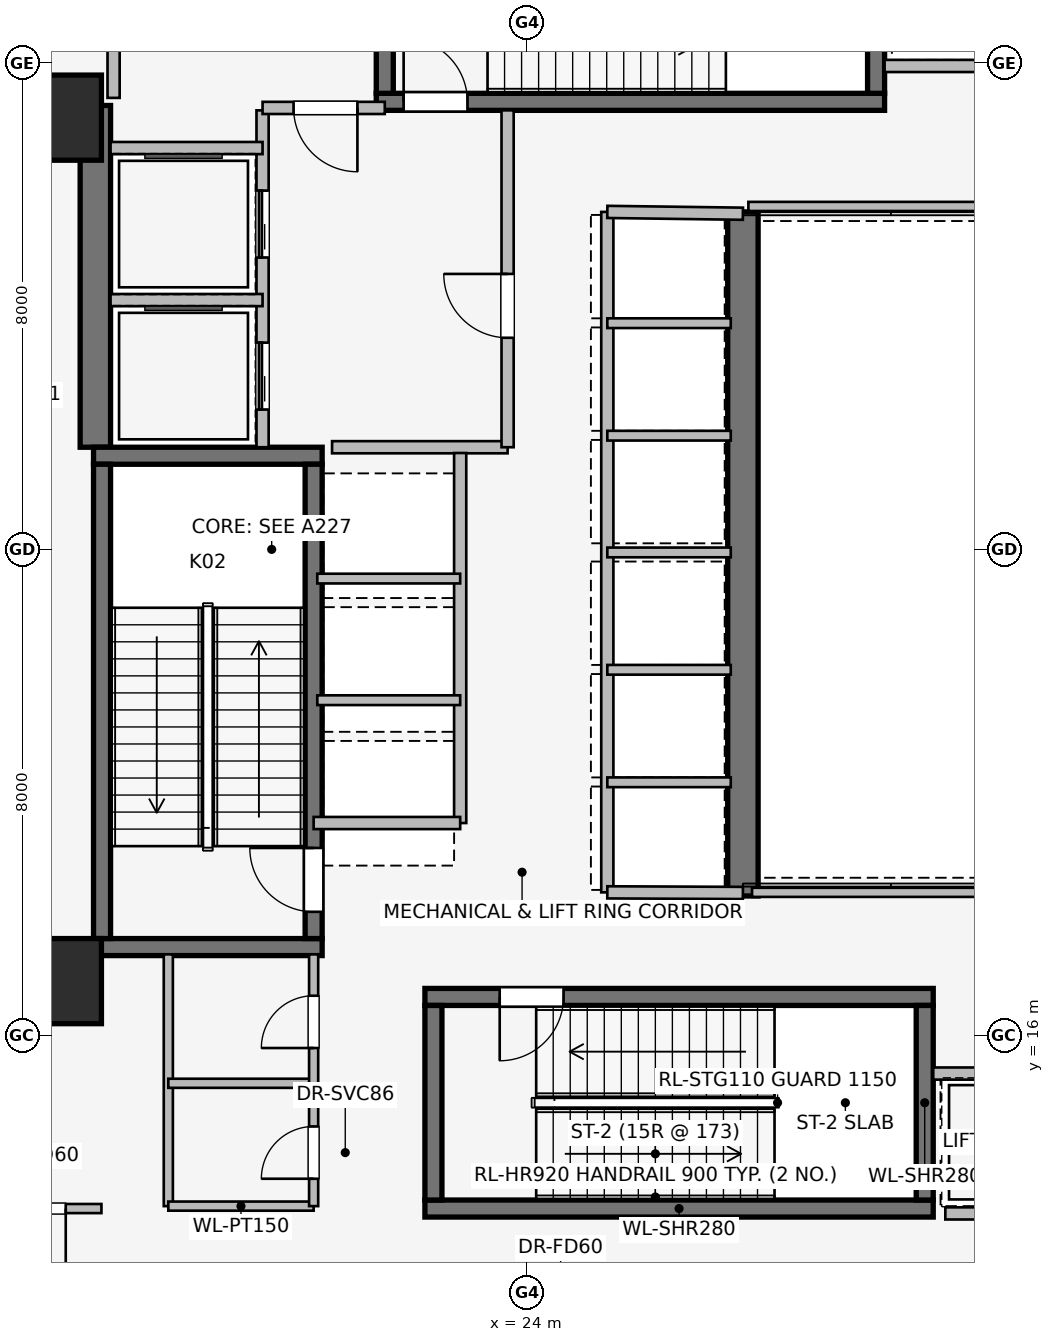
"""IFC4 building model, lengths in metres.
Left out: names, types, materials, properties, quantities, classifications, styles, units other than length and angle.
Written with IfcOpenShell. Run it as: python <this file> out.ifc"""

import sys

from ifc_helpers import new_model, si_unit, direction, frame, frame_2d, origin, origin_2d, place, context, subcontext, project, spatial, rectangle, extrude, element, fill, save


model = new_model("IFC4")
c1 = context("Model", 3, precision=1e-05, world=origin(), true_north=direction((0.0, 1.0)))
c2 = subcontext(c1, "Body", "Model", "MODEL_VIEW")
j1 = project(units=[si_unit("LENGTHUNIT", "METRE"), si_unit("PLANEANGLEUNIT", "RADIAN")], contexts=[c1])
p1 = place(None, origin())
s1 = spatial("IfcSite", under=j1, at=p1, CompositionType="ELEMENT")
p2 = place(p1, origin())
s2 = spatial("IfcBuilding", under=s1, at=p2, CompositionType="ELEMENT")
p3 = place(p2, frame((0.0, 0.0, 96.35)))
s3 = spatial("IfcBuildingStorey", under=s2, at=p3, CompositionType="ELEMENT", Elevation=96.35)
p4 = place(p3, frame((16.9, 25.68, 0.0), z_axis=(0.0, 0.0, 1.0), x_axis=(0.0, 1.0, 0.0)))
e1 = element("IfcWall", 1, at=p4, inside=s3, PredefinedType="SHEAR", context=c2, shape_type="SweptSolid", body=[
    extrude(rectangle(XDim=5.62, YDim=0.5, at=frame_2d((2.81, 0.0))), origin(), (0.0, 0.0, 1.0), 5.2),
])
p5 = place(p3, frame((27.55, 29.55, 0.0), z_axis=(0.0, 0.0, 1.0), x_axis=(0.0, -1.0, 0.0)))
e2 = element("IfcWall", 2, at=p5, inside=s3, PredefinedType="SHEAR", context=c2, shape_type="SweptSolid", body=[
    extrude(rectangle(XDim=11.25, YDim=0.5, at=frame_2d((5.625, 0.0))), origin(), (0.0, 0.0, 1.0), 5.2),
])
for number, where, z_axis, x_axis in (
    (3, (16.87, 17.46, 0.0), (0.0, 0.0, 1.0), (1.0, 0.0, 0.0)),
    (4, (20.63, 25.54, 0.0), (0.0, 0.0, 1.0), (-1.0, 0.0, 0.0)),
):
    element("IfcWall", number, at=place(p3, frame(where, z_axis=z_axis, x_axis=x_axis)), inside=s3, PredefinedType="SHEAR", context=c2, shape_type="SweptSolid", body=[
        extrude(rectangle(XDim=3.76, YDim=0.28, at=frame_2d((1.88, 0.0))), origin(), (0.0, 0.0, 1.0), 5.2),
    ])
p6 = place(p3, frame((17.01, 25.4, 0.0), z_axis=(0.0, 0.0, 1.0), x_axis=(0.0, -1.0, 0.0)))
e5 = element("IfcWall", 5, at=p6, inside=s3, PredefinedType="SHEAR", context=c2, shape_type="SweptSolid", body=[
    extrude(rectangle(XDim=7.8, YDim=0.28, at=frame_2d((3.9, 0.0))), origin(), (0.0, 0.0, 1.0), 5.2),
])
p7 = place(p3, frame((20.49, 17.6, 0.0), z_axis=(0.0, 0.0, 1.0), x_axis=(0.0, 1.0, 0.0)))
e6 = element("IfcWall", 6, at=p7, inside=s3, PredefinedType="SHEAR", context=c2, shape_type="SweptSolid", body=[
    extrude(rectangle(XDim=7.8, YDim=0.28, at=frame_2d((3.9, 0.0))), origin(), (0.0, 0.0, 1.0), 5.2),
])
p8 = place(p7, frame((0.44, 0.0, 0.0)))
e7 = element("IfcOpeningElement", 7, at=p8, cuts=e6, PredefinedType="OPENING", context=c2, shape_type="SweptSolid", body=[
    extrude(rectangle(XDim=1.05, YDim=2.0, at=frame_2d((0.525, 1.0))), frame((0.0, 0.15, 0.0), z_axis=(0.0, -1.0, 0.0), x_axis=(1.0, 0.0, 0.0)), (0.0, 0.0, 1.0), 0.3),
])
p9 = place(p3, frame((22.32, 13.16, 0.0), z_axis=(0.0, 0.0, 1.0), x_axis=(1.0, 0.0, 0.0)))
e8 = element("IfcWall", 8, at=p9, inside=s3, PredefinedType="SHEAR", context=c2, shape_type="SweptSolid", body=[
    extrude(rectangle(XDim=8.36, YDim=0.28, at=frame_2d((4.18, 0.0))), origin(), (0.0, 0.0, 1.0), 5.2),
])
p10 = place(p3, frame((30.68, 16.64, 0.0), z_axis=(0.0, 0.0, 1.0), x_axis=(-1.0, 0.0, 0.0)))
e9 = element("IfcWall", 9, at=p10, inside=s3, PredefinedType="SHEAR", context=c2, shape_type="SweptSolid", body=[
    extrude(rectangle(XDim=8.36, YDim=0.28, at=frame_2d((4.18, 0.0))), origin(), (0.0, 0.0, 1.0), 5.2),
])
p11 = place(p10, frame((6.08, 0.0, 0.0)))
e10 = element("IfcOpeningElement", 10, at=p11, cuts=e9, PredefinedType="OPENING", context=c2, shape_type="SweptSolid", body=[
    extrude(rectangle(XDim=1.05, YDim=2.0, at=frame_2d((0.525, 1.0))), frame((0.0, 0.15, 0.0), z_axis=(0.0, -1.0, 0.0), x_axis=(1.0, 0.0, 0.0)), (0.0, 0.0, 1.0), 0.3),
])
for number, where, z_axis, x_axis in (
    (11, (22.46, 16.5, 0.0), (0.0, 0.0, 1.0), (0.0, -1.0, 0.0)),
    (12, (30.54, 13.3, 0.0), (0.0, 0.0, 1.0), (0.0, 1.0, 0.0)),
):
    element("IfcWall", number, at=place(p3, frame(where, z_axis=z_axis, x_axis=x_axis)), inside=s3, PredefinedType="SHEAR", context=c2, shape_type="SweptSolid", body=[
        extrude(rectangle(XDim=3.2, YDim=0.28, at=frame_2d((1.6, 0.0))), origin(), (0.0, 0.0, 1.0), 5.2),
    ])
p12 = place(p3, frame((21.52, 31.36, 0.0), z_axis=(0.0, 0.0, 1.0), x_axis=(1.0, 0.0, 0.0)))
e13 = element("IfcWall", 13, at=p12, inside=s3, PredefinedType="SHEAR", context=c2, shape_type="SweptSolid", body=[
    extrude(rectangle(XDim=8.36, YDim=0.28, at=frame_2d((4.18, 0.0))), origin(), (0.0, 0.0, 1.0), 5.2),
])
p13 = place(p12, frame((0.45, 0.0, 0.0)))
e14 = element("IfcOpeningElement", 14, at=p13, cuts=e13, PredefinedType="OPENING", context=c2, shape_type="SweptSolid", body=[
    extrude(rectangle(XDim=1.05, YDim=2.0, at=frame_2d((0.525, 1.0))), frame((0.0, 0.15, 0.0), z_axis=(0.0, -1.0, 0.0), x_axis=(1.0, 0.0, 0.0)), (0.0, 0.0, 1.0), 0.3),
])
for number, where, z_axis, x_axis in (
    (15, (21.66, 34.7, 0.0), (0.0, 0.0, 1.0), (0.0, -1.0, 0.0)),
    (16, (29.74, 31.5, 0.0), (0.0, 0.0, 1.0), (0.0, 1.0, 0.0)),
):
    element("IfcWall", number, at=place(p3, frame(where, z_axis=z_axis, x_axis=x_axis)), inside=s3, PredefinedType="SHEAR", context=c2, shape_type="SweptSolid", body=[
        extrude(rectangle(XDim=3.2, YDim=0.28, at=frame_2d((1.6, 0.0))), origin(), (0.0, 0.0, 1.0), 5.2),
    ])
for number, where, z_axis, x_axis in (
    (17, (16.3, 16.9, 0.0), (0.0, 0.0, 1.0), (1.0, 0.0, 0.0)),
    (18, (16.3, 31.1, 0.0), (0.0, 0.0, 1.0), (1.0, 0.0, 0.0)),
):
    element("IfcColumn", number, at=place(p3, frame(where, z_axis=z_axis, x_axis=x_axis)), inside=s3, PredefinedType="COLUMN", context=c2, shape_type="SweptSolid", body=[
        extrude(rectangle(XDim=1.4, YDim=1.4, at=origin_2d()), origin(), (0.0, 0.0, 1.0), 5.2),
    ])
p14 = place(p3, frame((19.65, 25.68, 0.0), z_axis=(0.0, 0.0, 1.0), x_axis=(0.0, 1.0, 0.0)))
e19 = element("IfcWall", 19, at=p14, inside=s3, PredefinedType="PARTITIONING", context=c2, shape_type="SweptSolid", body=[
    extrude(rectangle(XDim=5.54, YDim=0.2, at=frame_2d((2.77, 0.0))), origin(), (0.0, 0.0, 1.0), 4.78),
])
p15 = place(p14, frame((0.62, 0.0, 0.0)))
e20 = element("IfcOpeningElement", 20, at=p15, cuts=e19, PredefinedType="OPENING", context=c2, shape_type="SweptSolid", body=[
    extrude(rectangle(XDim=1.1, YDim=2.2, at=frame_2d((0.55, 1.1))), frame((0.0, 0.11, 0.0), z_axis=(0.0, -1.0, 0.0), x_axis=(1.0, 0.0, 0.0)), (0.0, 0.0, 1.0), 0.22),
])
p16 = place(p14, frame((3.12, 0.0, 0.0)))
e21 = element("IfcOpeningElement", 21, at=p16, cuts=e19, PredefinedType="OPENING", context=c2, shape_type="SweptSolid", body=[
    extrude(rectangle(XDim=1.1, YDim=2.2, at=frame_2d((0.55, 1.1))), frame((0.0, 0.11, 0.0), z_axis=(0.0, -1.0, 0.0), x_axis=(1.0, 0.0, 0.0)), (0.0, 0.0, 1.0), 0.22),
])
p17 = place(p3, frame((20.793, 25.68, 0.0), z_axis=(0.0, 0.0, 1.0), x_axis=(1.0, 0.0, 0.0)))
e22 = element("IfcWall", 22, at=p17, inside=s3, PredefinedType="PARTITIONING", context=c2, shape_type="SweptSolid", body=[
    extrude(rectangle(XDim=2.887, YDim=0.2, at=frame_2d((1.443, 0.0))), origin(), (0.0, 0.0, 1.0), 4.78),
])
p18 = place(p3, frame((23.68, 25.68, 0.0), z_axis=(0.0, 0.0, 1.0), x_axis=(0.0, 1.0, 0.0)))
e23 = element("IfcWall", 23, at=p18, inside=s3, PredefinedType="PARTITIONING", context=c2, shape_type="SweptSolid", body=[
    extrude(rectangle(XDim=5.54, YDim=0.2, at=frame_2d((2.77, 0.0))), origin(), (0.0, 0.0, 1.0), 4.78),
])
p19 = place(p18, frame((1.8, 0.0, 0.0)))
e24 = element("IfcOpeningElement", 24, at=p19, cuts=e23, PredefinedType="OPENING", context=c2, shape_type="SweptSolid", body=[
    extrude(rectangle(XDim=1.05, YDim=2.0, at=frame_2d((0.525, 1.0))), frame((0.0, 0.11, 0.0), z_axis=(0.0, -1.0, 0.0), x_axis=(1.0, 0.0, 0.0)), (0.0, 0.0, 1.0), 0.22),
])
p20 = place(p3, frame((21.66, 31.26, 0.0), z_axis=(0.0, 0.0, 1.0), x_axis=(-1.0, 0.0, 0.0)))
e25 = element("IfcWall", 25, at=p20, inside=s3, PredefinedType="PARTITIONING", context=c2, shape_type="SweptSolid", body=[
    extrude(rectangle(XDim=2.01, YDim=0.2, at=frame_2d((1.005, 0.0))), origin(), (0.0, 0.0, 1.0), 4.78),
])
p21 = place(p20, frame((0.45, 0.0, 0.0)))
e26 = element("IfcOpeningElement", 26, at=p21, cuts=e25, PredefinedType="OPENING", context=c2, shape_type="SweptSolid", body=[
    extrude(rectangle(XDim=1.05, YDim=2.0, at=frame_2d((0.525, 1.0))), frame((0.0, 0.11, 0.0), z_axis=(0.0, -1.0, 0.0), x_axis=(1.0, 0.0, 0.0)), (0.0, 0.0, 1.0), 0.22),
])
p22 = place(p3, frame((17.15, 28.1, 0.0), z_axis=(0.0, 0.0, 1.0), x_axis=(1.0, 0.0, 0.0)))
e27 = element("IfcWall", 27, at=p22, inside=s3, PredefinedType="PARTITIONING", context=c2, shape_type="SweptSolid", body=[
    extrude(rectangle(XDim=2.5, YDim=0.2, at=frame_2d((1.25, 0.0))), origin(), (0.0, 0.0, 1.0), 4.78),
])
p23 = place(p3, frame((19.65, 30.6, 0.0), z_axis=(0.0, 0.0, 1.0), x_axis=(-1.0, 0.0, 0.0)))
e28 = element("IfcWall", 28, at=p23, inside=s3, PredefinedType="PARTITIONING", context=c2, shape_type="SweptSolid", body=[
    extrude(rectangle(XDim=2.5, YDim=0.2, at=frame_2d((1.25, 0.0))), origin(), (0.0, 0.0, 1.0), 3.68),
])
p24 = place(p3, frame((33.5, 15.38, 0.0), z_axis=(0.0, 0.0, 1.0), x_axis=(-1.0, 0.0, 0.0)))
e29 = element("IfcWall", 29, at=p24, inside=s3, PredefinedType="PARTITIONING", context=c2, shape_type="SweptSolid", body=[
    extrude(rectangle(XDim=2.82, YDim=0.2, at=frame_2d((1.41, 0.0))), origin(), (0.0, 0.0, 1.0), 4.78),
])
p25 = place(p24, frame((0.8, 0.0, 0.0)))
e30 = element("IfcOpeningElement", 30, at=p25, cuts=e29, PredefinedType="OPENING", context=c2, shape_type="SweptSolid", body=[
    extrude(rectangle(XDim=1.2, YDim=2.2, at=frame_2d((0.6, 1.1))), frame((0.0, 0.11, 0.0), z_axis=(0.0, -1.0, 0.0), x_axis=(1.0, 0.0, 0.0)), (0.0, 0.0, 1.0), 0.22),
])
p26 = place(p3, frame((30.879, 13.08, 0.0), z_axis=(0.0, 0.0, 1.0), x_axis=(1.0, 0.0, 0.0)))
e31 = element("IfcWall", 31, at=p26, inside=s3, PredefinedType="PARTITIONING", context=c2, shape_type="SweptSolid", body=[
    extrude(rectangle(XDim=2.621, YDim=0.2, at=frame_2d((1.311, 0.0))), origin(), (0.0, 0.0, 1.0), 4.78),
])
p27 = place(p3, frame((32.48, 31.95, 0.0), z_axis=(0.0, 0.0, 1.0), x_axis=(-1.0, 0.0, 0.0)))
e32 = element("IfcWall", 32, at=p27, inside=s3, PredefinedType="PARTITIONING", context=c2, shape_type="SweptSolid", body=[
    extrude(rectangle(XDim=2.6, YDim=0.2, at=frame_2d((1.3, 0.0))), origin(), (0.0, 0.0, 1.0), 4.78),
])
p28 = place(p3, frame((22.9, 19.5, 0.0), z_axis=(0.0, 0.0, 1.0), x_axis=(0.0, 1.0, 0.0)))
e33 = element("IfcWall", 33, at=p28, inside=s3, PredefinedType="PARTITIONING", context=c2, shape_type="SweptSolid", body=[
    extrude(rectangle(XDim=6.085, YDim=0.2, at=frame_2d((3.042, 0.0))), origin(), (0.0, 0.0, 1.0), 4.78),
])
p29 = place(p3, frame((20.49, 19.5, 0.0), z_axis=(0.0, 0.0, 1.0), x_axis=(1.0, 0.0, 0.0)))
e34 = element("IfcWall", 34, at=p29, inside=s3, PredefinedType="PARTITIONING", context=c2, shape_type="SweptSolid", body=[
    extrude(rectangle(XDim=2.41, YDim=0.2, at=frame_2d((1.205, 0.0))), origin(), (0.0, 0.0, 1.0), 3.68),
])
for number, where, z_axis, x_axis in (
    (35, (20.55, 21.52, 0.0), (0.0, 0.0, 1.0), (1.0, 0.0, 0.0)),
    (36, (20.55, 23.52, 0.0), (0.0, 0.0, 1.0), (1.0, 0.0, 0.0)),
):
    element("IfcWall", number, at=place(p3, frame(where, z_axis=z_axis, x_axis=x_axis)), inside=s3, PredefinedType="PARTITIONING", context=c2, shape_type="SweptSolid", body=[
        extrude(rectangle(XDim=2.35, YDim=0.16, at=frame_2d((1.175, 0.0))), origin(), (0.0, 0.0, 1.0), 4.78),
    ])
p30 = place(p3, frame((25.32, 29.55, 0.0), z_axis=(0.0, 0.0, 1.0), x_axis=(0.0, -1.0, 0.0)))
e37 = element("IfcWall", 37, at=p30, inside=s3, PredefinedType="PARTITIONING", context=c2, shape_type="SweptSolid", body=[
    extrude(rectangle(XDim=11.19, YDim=0.2, at=frame_2d((5.595, 0.0))), origin(), (0.0, 0.0, 1.0), 4.78),
])
p31 = place(p3, frame((25.32, 18.36, 0.0), z_axis=(0.0, 0.0, 1.0), x_axis=(0.999989925833, -0.004488678231, 0.0)))
e38 = element("IfcWall", 38, at=p31, inside=s3, PredefinedType="PARTITIONING", context=c2, shape_type="SweptSolid", body=[
    extrude(rectangle(XDim=2.23, YDim=0.2, at=frame_2d((1.115, 0.0))), origin(), (0.0, 0.0, 1.0), 4.78),
])
p32 = place(p3, frame((27.55, 29.52, 0.0), z_axis=(0.0, 0.0, 1.0), x_axis=(-0.999909343457, 0.013464949556, 0.0)))
e39 = element("IfcWall", 39, at=p32, inside=s3, PredefinedType="PARTITIONING", context=c2, shape_type="SweptSolid", body=[
    extrude(rectangle(XDim=2.23, YDim=0.2, at=frame_2d((1.115, 0.0))), origin(), (0.0, 0.0, 1.0), 3.68),
])
p33 = place(p3, frame((25.32, 20.17, 0.0), z_axis=(0.0, 0.0, 1.0), x_axis=(1.0, 0.0, 0.0)))
e40 = element("IfcWall", 40, at=p33, inside=s3, PredefinedType="PARTITIONING", context=c2, shape_type="SweptSolid", body=[
    extrude(rectangle(XDim=2.03, YDim=0.16, at=frame_2d((1.015, 0.0))), origin(), (0.0, 0.0, 1.0), 3.68),
])
for number, where, z_axis, x_axis in (
    (41, (25.32, 22.02, 0.0), (0.0, 0.0, 1.0), (1.0, 0.0, 0.0)),
    (42, (25.32, 23.95, 0.0), (0.0, 0.0, 1.0), (1.0, 0.0, 0.0)),
    (43, (25.32, 25.87, 0.0), (0.0, 0.0, 1.0), (1.0, 0.0, 0.0)),
    (44, (25.32, 27.72, 0.0), (0.0, 0.0, 1.0), (1.0, 0.0, 0.0)),
):
    element("IfcWall", number, at=place(p3, frame(where, z_axis=z_axis, x_axis=x_axis)), inside=s3, PredefinedType="PARTITIONING", context=c2, shape_type="SweptSolid", body=[
        extrude(rectangle(XDim=2.03, YDim=0.16, at=frame_2d((1.015, 0.0))), origin(), (0.0, 0.0, 1.0), 4.78),
    ])
p34 = place(p3, frame((18.1, 17.34, 0.0), z_axis=(0.0, 0.0, 1.0), x_axis=(0.0, -1.0, 0.0)))
e45 = element("IfcWall", 45, at=p34, inside=s3, PredefinedType="PARTITIONING", context=c2, shape_type="SweptSolid", body=[
    extrude(rectangle(XDim=4.14, YDim=0.15, at=frame_2d((2.07, 0.0))), origin(), (0.0, 0.0, 1.0), 4.78),
])
for number, where, z_axis, x_axis in (
    (46, (18.1, 13.2, 0.0), (0.0, 0.0, 1.0), (1.0, 0.0, 0.0)),
    (47, (18.1, 15.22, 0.0), (0.0, 0.0, 1.0), (1.0, 0.0, 0.0)),
):
    element("IfcWall", number, at=place(p3, frame(where, z_axis=z_axis, x_axis=x_axis)), inside=s3, PredefinedType="PARTITIONING", context=c2, shape_type="SweptSolid", body=[
        extrude(rectangle(XDim=2.39, YDim=0.15, at=frame_2d((1.195, 0.0))), origin(), (0.0, 0.0, 1.0), 4.78),
    ])
p35 = place(p3, frame((20.49, 13.2, 0.0), z_axis=(0.0, 0.0, 1.0), x_axis=(0.0, 1.0, 0.0)))
e48 = element("IfcWall", 48, at=p35, inside=s3, PredefinedType="PARTITIONING", context=c2, shape_type="SweptSolid", body=[
    extrude(rectangle(XDim=4.14, YDim=0.15, at=frame_2d((2.07, 0.0))), origin(), (0.0, 0.0, 1.0), 4.78),
])
p36 = place(p35, frame((0.45, 0.0, 0.0)))
e49 = element("IfcOpeningElement", 49, at=p36, cuts=e48, PredefinedType="OPENING", context=c2, shape_type="SweptSolid", body=[
    extrude(rectangle(XDim=0.86, YDim=2.0, at=frame_2d((0.43, 1.0))), frame((0.0, 0.085, 0.0), z_axis=(0.0, -1.0, 0.0), x_axis=(1.0, 0.0, 0.0)), (0.0, 0.0, 1.0), 0.17),
])
p37 = place(p35, frame((2.6, 0.0, 0.0)))
e50 = element("IfcOpeningElement", 50, at=p37, cuts=e48, PredefinedType="OPENING", context=c2, shape_type="SweptSolid", body=[
    extrude(rectangle(XDim=0.86, YDim=2.0, at=frame_2d((0.43, 1.0))), frame((0.0, 0.085, 0.0), z_axis=(0.0, -1.0, 0.0), x_axis=(1.0, 0.0, 0.0)), (0.0, 0.0, 1.0), 0.17),
])
p38 = place(p3, frame((17.2, 36.65, 0.0), z_axis=(0.0, 0.0, 1.0), x_axis=(0.0, -1.0, 0.0)))
e51 = element("IfcWall", 51, at=p38, inside=s3, PredefinedType="PARTITIONING", context=c2, shape_type="SweptSolid", body=[
    extrude(rectangle(XDim=5.225, YDim=0.2, at=frame_2d((2.612, 0.0))), origin(), (0.0, 0.0, 1.0), 4.78),
])
p39 = place(p3, frame((27.7, 18.36, 0.0), z_axis=(0.0, 0.0, 1.0), x_axis=(1.0, 0.0, 0.0)))
e52 = element("IfcWall", 52, at=p39, inside=s3, PredefinedType="PARTITIONING", context=c2, shape_type="SweptSolid", body=[
    extrude(rectangle(XDim=12.14, YDim=0.15, at=frame_2d((6.07, 0.0))), origin(), (0.0, 0.0, 1.0), 3.921),
])
p40 = place(p3, frame((39.84, 29.64, 0.0), z_axis=(0.0, 0.0, 1.0), x_axis=(-1.0, 0.0, 0.0)))
e53 = element("IfcWall", 53, at=p40, inside=s3, PredefinedType="PARTITIONING", context=c2, shape_type="SweptSolid", body=[
    extrude(rectangle(XDim=12.2, YDim=0.15, at=frame_2d((6.1, 0.0))), origin(), (0.0, 0.0, 1.0), 3.921),
])
p41 = place(p3, frame((17.0, 13.16, 0.0), z_axis=(0.0, 0.0, 1.0), x_axis=(-1.0, 0.0, 0.0)))
e54 = element("IfcWall", 54, at=p41, inside=s3, PredefinedType="PARTITIONING", context=c2, shape_type="SweptSolid", body=[
    extrude(rectangle(XDim=2.1, YDim=0.15, at=frame_2d((1.05, 0.0))), origin(), (0.0, 0.0, 1.0), 4.78),
])
p42 = place(p41, frame((0.587, 0.0, 0.0)))
e55 = element("IfcOpeningElement", 55, at=p42, cuts=e54, PredefinedType="OPENING", context=c2, shape_type="SweptSolid", body=[
    extrude(rectangle(XDim=0.96, YDim=2.0, at=frame_2d((0.48, 1.0))), frame((0.0, 0.085, 0.0), z_axis=(0.0, -1.0, 0.0), x_axis=(1.0, 0.0, 0.0)), (0.0, 0.0, 1.0), 0.17),
])
p43 = place(p8, origin())
e56 = element("IfcDoor", 56, at=p43, inside=s3, OperationType="SINGLE_SWING_RIGHT", PredefinedType="DOOR", context=c2, shape_type="SweptSolid", body=[
    extrude(rectangle(XDim=1.05, YDim=2.0, at=frame_2d((0.525, 1.0))), frame((0.0, 0.025, 0.0), z_axis=(0.0, -1.0, 0.0), x_axis=(1.0, 0.0, 0.0)), (0.0, 0.0, 1.0), 0.05),
])
fill(e7, e56)
p44 = place(p11, origin())
e57 = element("IfcDoor", 57, at=p44, inside=s3, OperationType="SINGLE_SWING_RIGHT", PredefinedType="DOOR", context=c2, shape_type="SweptSolid", body=[
    extrude(rectangle(XDim=1.05, YDim=2.0, at=frame_2d((0.525, 1.0))), frame((0.0, 0.025, 0.0), z_axis=(0.0, -1.0, 0.0), x_axis=(1.0, 0.0, 0.0)), (0.0, 0.0, 1.0), 0.05),
])
fill(e10, e57)
p45 = place(p13, origin())
e58 = element("IfcDoor", 58, at=p45, inside=s3, OperationType="SINGLE_SWING_LEFT", PredefinedType="DOOR", context=c2, shape_type="SweptSolid", body=[
    extrude(rectangle(XDim=1.05, YDim=2.0, at=frame_2d((0.525, 1.0))), frame((0.0, 0.025, 0.0), z_axis=(0.0, -1.0, 0.0), x_axis=(1.0, 0.0, 0.0)), (0.0, 0.0, 1.0), 0.05),
])
fill(e14, e58)
p46 = place(p15, origin())
e59 = element("IfcDoor", 59, at=p46, inside=s3, OperationType="SLIDING_TO_LEFT", PredefinedType="DOOR", context=c2, shape_type="SweptSolid", body=[
    extrude(rectangle(XDim=1.1, YDim=2.2, at=frame_2d((0.55, 1.1))), frame((0.0, 0.025, 0.0), z_axis=(0.0, -1.0, 0.0), x_axis=(1.0, 0.0, 0.0)), (0.0, 0.0, 1.0), 0.05),
])
fill(e20, e59)
p47 = place(p16, origin())
e60 = element("IfcDoor", 60, at=p47, inside=s3, OperationType="SLIDING_TO_LEFT", PredefinedType="DOOR", context=c2, shape_type="SweptSolid", body=[
    extrude(rectangle(XDim=1.1, YDim=2.2, at=frame_2d((0.55, 1.1))), frame((0.0, 0.025, 0.0), z_axis=(0.0, -1.0, 0.0), x_axis=(1.0, 0.0, 0.0)), (0.0, 0.0, 1.0), 0.05),
])
fill(e21, e60)
p48 = place(p19, origin())
e61 = element("IfcDoor", 61, at=p48, inside=s3, OperationType="SINGLE_SWING_RIGHT", PredefinedType="DOOR", context=c2, shape_type="SweptSolid", body=[
    extrude(rectangle(XDim=1.05, YDim=2.0, at=frame_2d((0.525, 1.0))), frame((0.0, 0.025, 0.0), z_axis=(0.0, -1.0, 0.0), x_axis=(1.0, 0.0, 0.0)), (0.0, 0.0, 1.0), 0.05),
])
fill(e24, e61)
p49 = place(p21, origin())
e62 = element("IfcDoor", 62, at=p49, inside=s3, OperationType="SINGLE_SWING_LEFT", PredefinedType="DOOR", context=c2, shape_type="SweptSolid", body=[
    extrude(rectangle(XDim=1.05, YDim=2.0, at=frame_2d((0.525, 1.0))), frame((0.0, 0.025, 0.0), z_axis=(0.0, -1.0, 0.0), x_axis=(1.0, 0.0, 0.0)), (0.0, 0.0, 1.0), 0.05),
])
fill(e26, e62)
p50 = place(p36, origin())
e63 = element("IfcDoor", 63, at=p50, inside=s3, OperationType="SINGLE_SWING_LEFT", PredefinedType="DOOR", context=c2, shape_type="SweptSolid", body=[
    extrude(rectangle(XDim=0.86, YDim=2.0, at=frame_2d((0.43, 1.0))), frame((0.0, 0.025, 0.0), z_axis=(0.0, -1.0, 0.0), x_axis=(1.0, 0.0, 0.0)), (0.0, 0.0, 1.0), 0.05),
])
fill(e49, e63)
p51 = place(p37, origin())
e64 = element("IfcDoor", 64, at=p51, inside=s3, OperationType="SINGLE_SWING_LEFT", PredefinedType="DOOR", context=c2, shape_type="SweptSolid", body=[
    extrude(rectangle(XDim=0.86, YDim=2.0, at=frame_2d((0.43, 1.0))), frame((0.0, 0.025, 0.0), z_axis=(0.0, -1.0, 0.0), x_axis=(1.0, 0.0, 0.0)), (0.0, 0.0, 1.0), 0.05),
])
fill(e50, e64)
p52 = place(p42, origin())
e65 = element("IfcDoor", 65, at=p52, inside=s3, OperationType="SINGLE_SWING_LEFT", PredefinedType="DOOR", context=c2, shape_type="SweptSolid", body=[
    extrude(rectangle(XDim=0.96, YDim=2.0, at=frame_2d((0.48, 1.0))), frame((0.0, 0.025, 0.0), z_axis=(0.0, -1.0, 0.0), x_axis=(1.0, 0.0, 0.0)), (0.0, 0.0, 1.0), 0.05),
])
fill(e55, e65)
save(model, sys.argv[1])
